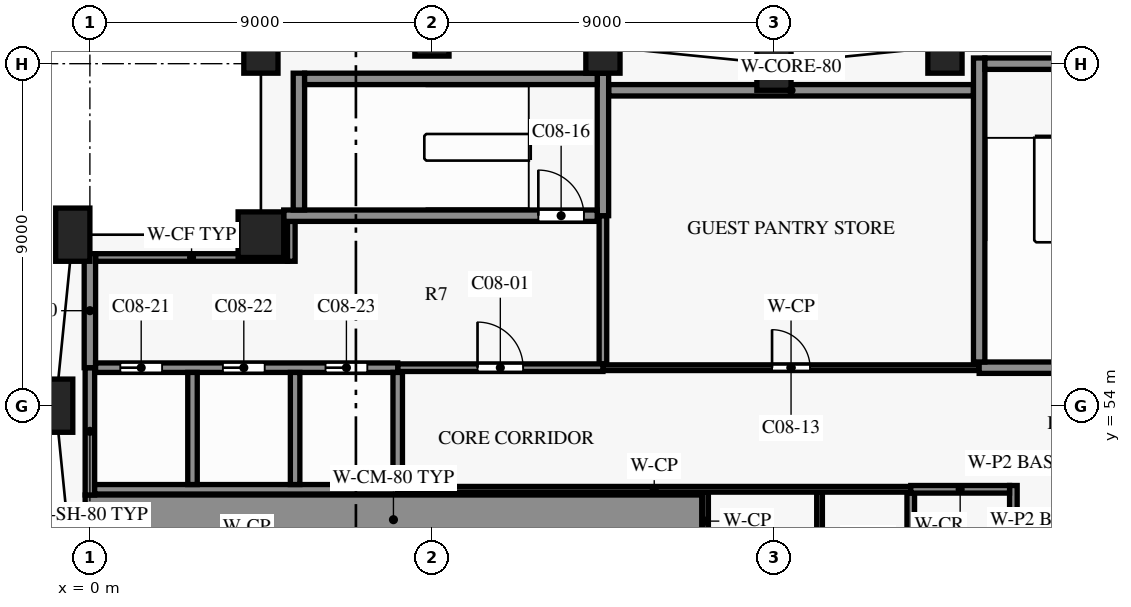
"""IFC4 building model, lengths in metres.
Left out: names, types, materials, properties, quantities, classifications, styles, units other than length and angle.
Written with IfcOpenShell. Run it as: python <this file> out.ifc"""

import sys

from ifc_helpers import new_model, si_unit, direction, frame, frame_2d, origin, origin_2d, place, context, subcontext, project, spatial, rectangle, extrude, element, fill, save


model = new_model("IFC4")
c1 = context("Model", 3, precision=1e-05, world=origin(), true_north=direction((0.0, 1.0)))
c2 = subcontext(c1, "Body", "Model", "MODEL_VIEW")
j1 = project(units=[si_unit("LENGTHUNIT", "METRE"), si_unit("PLANEANGLEUNIT", "RADIAN")], contexts=[c1])
p1 = place(None, origin())
s1 = spatial("IfcSite", under=j1, at=p1, CompositionType="ELEMENT")
p2 = place(p1, origin())
s2 = spatial("IfcBuilding", under=s1, at=p2, CompositionType="ELEMENT")
p3 = place(p2, frame((0.0, 0.0, 44.7)))
s3 = spatial("IfcBuildingStorey", under=s2, at=p3, CompositionType="ELEMENT", Elevation=44.7)
for number, where, z_axis, x_axis in (
    (1, (22.5, 63.45, 0.0), (0.0, 0.0, 1.0), (-0.995, -0.1, 0.0)),
    (2, (18.0, 63.0, 0.0), (0.0, 0.0, 1.0), (-1.0, 0.0, 0.0)),
    (3, (13.5, 63.45, 0.0), (0.0, 0.0, 1.0), (-0.995, 0.1, 0.0)),
    (4, (9.0, 63.9, 0.0), (0.0, 0.0, 1.0), (-1.0, 0.0, 0.0)),
    (5, (4.5, 63.45, 0.0), (0.0, 0.0, 1.0), (-0.995, -0.1, 0.0)),
    (6, (-0.45, 58.5, 0.0), (0.0, 0.0, 1.0), (-0.1, -0.995, 0.0)),
    (7, (-0.9, 54.0, 0.0), (0.0, 0.0, 1.0), (0.0, -1.0, 0.0)),
):
    element("IfcColumn", number, at=place(p3, frame(where, z_axis=z_axis, x_axis=x_axis)), inside=s3, PredefinedType="COLUMN", context=c2, shape_type="SweptSolid", body=[
        extrude(rectangle(XDim=0.9, YDim=1.4, at=origin_2d()), origin(), (0.0, 0.0, 1.0), 3.6),
    ])
p4 = place(p3, frame((4.5, 58.5, 0.0), z_axis=(0.0, 0.0, 1.0), x_axis=(1.0, 0.0, 0.0)))
e8 = element("IfcColumn", 8, at=p4, inside=s3, PredefinedType="COLUMN", context=c2, shape_type="SweptSolid", body=[
    extrude(rectangle(XDim=1.2, YDim=1.2, at=origin_2d()), origin(), (0.0, 0.0, 1.0), 3.6),
])
p5 = place(p3, frame((-0.125, 51.0, 0.0), z_axis=(0.0, 0.0, 1.0), x_axis=(1.0, 0.0, 0.0)))
e9 = element("IfcWall", 9, at=p5, inside=s3, PredefinedType="SHEAR", context=c2, shape_type="SweptSolid", body=[
    extrude(rectangle(XDim=16.225, YDim=1.3, at=frame_2d((8.113, 0.0))), origin(), (0.0, 0.0, 1.0), 3.3),
])
p6 = place(p3, frame((8.1, 51.8, 0.0), z_axis=(0.0, 0.0, 1.0), x_axis=(1.0, 0.0, 0.0)))
e10 = element("IfcWall", 10, at=p6, inside=s3, PredefinedType="PARTITIONING", context=c2, shape_type="SweptSolid", body=[
    extrude(rectangle(XDim=13.5, YDim=0.15, at=frame_2d((6.75, 0.0))), origin(), (0.0, 0.0, 1.0), 3.3),
])
p7 = place(p3, frame((21.6, 51.8, 0.0), z_axis=(0.0, 0.0, 1.0), x_axis=(1.0, 0.0, 0.0)))
e11 = element("IfcWall", 11, at=p7, inside=s3, PredefinedType="PARTITIONING", context=c2, shape_type="SweptSolid", body=[
    extrude(rectangle(XDim=2.6, YDim=0.2, at=frame_2d((1.3, 0.0))), origin(), (0.0, 0.0, 1.0), 3.3),
])
p8 = place(p3, frame((0.125, 51.8, 0.0), z_axis=(0.0, 0.0, 1.0), x_axis=(1.0, 0.0, 0.0)))
e12 = element("IfcWall", 12, at=p8, inside=s3, PredefinedType="SHEAR", context=c2, shape_type="SweptSolid", body=[
    extrude(rectangle(XDim=7.975, YDim=0.25, at=frame_2d((3.988, 0.0))), origin(), (0.0, 0.0, 1.0), 3.3),
])
p9 = place(p3, frame((8.1, 55.0, 0.0), z_axis=(0.0, 0.0, 1.0), x_axis=(1.0, 0.0, 0.0)))
e13 = element("IfcWall", 13, at=p9, inside=s3, PredefinedType="PARTITIONING", context=c2, shape_type="SweptSolid", body=[
    extrude(rectangle(XDim=5.4, YDim=0.2, at=frame_2d((2.7, 0.0))), origin(), (0.0, 0.0, 1.0), 3.3),
])
p10 = place(p9, frame((2.1, 0.0, 0.0)))
e14 = element("IfcOpeningElement", 14, at=p10, cuts=e13, PredefinedType="OPENING", context=c2, shape_type="SweptSolid", body=[
    extrude(rectangle(XDim=1.2, YDim=2.2, at=frame_2d((0.6, 1.1))), frame((0.0, 0.11, 0.0), z_axis=(0.0, -1.0, 0.0), x_axis=(1.0, 0.0, 0.0)), (0.0, 0.0, 1.0), 0.22),
])
p11 = place(p3, frame((13.5, 55.0, 0.0), z_axis=(0.0, 0.0, 1.0), x_axis=(1.0, 0.0, 0.0)))
e15 = element("IfcWall", 15, at=p11, inside=s3, PredefinedType="PARTITIONING", context=c2, shape_type="SweptSolid", body=[
    extrude(rectangle(XDim=9.9, YDim=0.15, at=frame_2d((4.95, 0.0))), origin(), (0.0, 0.0, 1.0), 3.3),
])
p12 = place(p11, frame((4.45, 0.0, 0.0)))
e16 = element("IfcOpeningElement", 16, at=p12, cuts=e15, PredefinedType="OPENING", context=c2, shape_type="SweptSolid", body=[
    extrude(rectangle(XDim=1.0, YDim=2.1, at=frame_2d((0.5, 1.05))), frame((0.0, 0.085, 0.0), z_axis=(0.0, -1.0, 0.0), x_axis=(1.0, 0.0, 0.0)), (0.0, 0.0, 1.0), 0.17),
])
p13 = place(p3, frame((0.15, 55.0, 0.0), z_axis=(0.0, 0.0, 1.0), x_axis=(1.0, 0.0, 0.0)))
e17 = element("IfcWall", 17, at=p13, inside=s3, PredefinedType="SHEAR", context=c2, shape_type="SweptSolid", body=[
    extrude(rectangle(XDim=7.95, YDim=0.25, at=frame_2d((3.975, 0.0))), origin(), (0.0, 0.0, 1.0), 3.3),
])
p14 = place(p13, frame((0.65, 0.0, 0.0)))
e18 = element("IfcOpeningElement", 18, at=p14, cuts=e17, PredefinedType="OPENING", context=c2, shape_type="SweptSolid", body=[
    extrude(rectangle(XDim=1.1, YDim=2.1, at=frame_2d((0.55, 1.05))), frame((0.0, 0.135, 0.0), z_axis=(0.0, -1.0, 0.0), x_axis=(1.0, 0.0, 0.0)), (0.0, 0.0, 1.0), 0.27),
])
p15 = place(p13, frame((3.35, 0.0, 0.0)))
e19 = element("IfcOpeningElement", 19, at=p15, cuts=e17, PredefinedType="OPENING", context=c2, shape_type="SweptSolid", body=[
    extrude(rectangle(XDim=1.1, YDim=2.1, at=frame_2d((0.55, 1.05))), frame((0.0, 0.135, 0.0), z_axis=(0.0, -1.0, 0.0), x_axis=(1.0, 0.0, 0.0)), (0.0, 0.0, 1.0), 0.27),
])
p16 = place(p13, frame((6.05, 0.0, 0.0)))
e20 = element("IfcOpeningElement", 20, at=p16, cuts=e17, PredefinedType="OPENING", context=c2, shape_type="SweptSolid", body=[
    extrude(rectangle(XDim=1.1, YDim=2.1, at=frame_2d((0.55, 1.05))), frame((0.0, 0.135, 0.0), z_axis=(0.0, -1.0, 0.0), x_axis=(1.0, 0.0, 0.0)), (0.0, 0.0, 1.0), 0.27),
])
p17 = place(p3, frame((23.4, 55.0, 0.0), z_axis=(0.0, 0.0, 1.0), x_axis=(1.0, 0.0, 0.0)))
e21 = element("IfcWall", 21, at=p17, inside=s3, PredefinedType="SHEAR", context=c2, shape_type="SweptSolid", body=[
    extrude(rectangle(XDim=3.45, YDim=0.3, at=frame_2d((1.725, 0.0))), origin(), (0.0, 0.0, 1.0), 3.3),
])
p18 = place(p3, frame((0.15, 57.9, 0.0), z_axis=(0.0, 0.0, 1.0), x_axis=(1.0, 0.0, 0.0)))
e22 = element("IfcWall", 22, at=p18, inside=s3, PredefinedType="PARTITIONING", context=c2, shape_type="SweptSolid", body=[
    extrude(rectangle(XDim=5.05, YDim=0.2, at=frame_2d((2.525, 0.0))), origin(), (0.0, 0.0, 1.0), 3.3),
])
p19 = place(p3, frame((5.1, 59.0, 0.0), z_axis=(0.0, 0.0, 1.0), x_axis=(1.0, 0.0, 0.0)))
e23 = element("IfcWall", 23, at=p19, inside=s3, PredefinedType="SHEAR", context=c2, shape_type="SweptSolid", body=[
    extrude(rectangle(XDim=8.25, YDim=0.3, at=frame_2d((4.125, 0.0))), origin(), (0.0, 0.0, 1.0), 3.3),
])
p20 = place(p19, frame((6.7, 0.0, 0.0)))
e24 = element("IfcOpeningElement", 24, at=p20, cuts=e23, PredefinedType="OPENING", context=c2, shape_type="SweptSolid", body=[
    extrude(rectangle(XDim=1.2, YDim=2.2, at=frame_2d((0.6, 1.1))), frame((0.0, 0.16, 0.0), z_axis=(0.0, -1.0, 0.0), x_axis=(1.0, 0.0, 0.0)), (0.0, 0.0, 1.0), 0.32),
])
p21 = place(p3, frame((13.65, 62.3, 0.0), z_axis=(0.0, 0.0, 1.0), x_axis=(1.0, 0.0, 0.0)))
e25 = element("IfcWall", 25, at=p21, inside=s3, PredefinedType="SHEAR", context=c2, shape_type="SweptSolid", body=[
    extrude(rectangle(XDim=9.6, YDim=0.3, at=frame_2d((4.8, 0.0))), origin(), (0.0, 0.0, 1.0), 3.3),
])
p22 = place(p3, frame((5.65, 62.6, 0.0), z_axis=(0.0, 0.0, 1.0), x_axis=(1.0, 0.0, 0.0)))
e26 = element("IfcWall", 26, at=p22, inside=s3, PredefinedType="SHEAR", context=c2, shape_type="SweptSolid", body=[
    extrude(rectangle(XDim=7.7, YDim=0.3, at=frame_2d((3.85, 0.0))), origin(), (0.0, 0.0, 1.0), 3.3),
])
p23 = place(p3, frame((23.55, 63.0, 0.0), z_axis=(0.0, 0.0, 1.0), x_axis=(1.0, 0.0, 0.0)))
e27 = element("IfcWall", 27, at=p23, inside=s3, PredefinedType="SHEAR", context=c2, shape_type="SweptSolid", body=[
    extrude(rectangle(XDim=3.3, YDim=0.3, at=frame_2d((1.65, 0.0))), origin(), (0.0, 0.0, 1.0), 3.3),
])
p24 = place(p3, frame((0.0, 55.0, 0.0), z_axis=(0.0, 0.0, 1.0), x_axis=(0.0, 1.0, 0.0)))
e28 = element("IfcWall", 28, at=p24, inside=s3, PredefinedType="SHEAR", context=c2, shape_type="SweptSolid", body=[
    extrude(rectangle(XDim=3.0, YDim=0.3, at=frame_2d((1.5, 0.0))), origin(), (0.0, 0.0, 1.0), 3.3),
])
p25 = place(p3, frame((0.0, 51.65, 0.0), z_axis=(0.0, 0.0, 1.0), x_axis=(0.0, 1.0, 0.0)))
e29 = element("IfcWall", 29, at=p25, inside=s3, PredefinedType="SHEAR", context=c2, shape_type="SweptSolid", body=[
    extrude(rectangle(XDim=3.35, YDim=0.25, at=frame_2d((1.675, 0.0))), origin(), (0.0, 0.0, 1.0), 3.3),
])
p26 = place(p3, frame((2.7, 51.925, 0.0), z_axis=(0.0, 0.0, 1.0), x_axis=(0.0, 1.0, 0.0)))
e30 = element("IfcWall", 30, at=p26, inside=s3, PredefinedType="SHEAR", context=c2, shape_type="SweptSolid", body=[
    extrude(rectangle(XDim=2.95, YDim=0.25, at=frame_2d((1.475, 0.0))), origin(), (0.0, 0.0, 1.0), 3.3),
])
p27 = place(p3, frame((5.3, 57.8, 0.0), z_axis=(0.0, 0.0, 1.0), x_axis=(0.0, 1.0, 0.0)))
e31 = element("IfcWall", 31, at=p27, inside=s3, PredefinedType="PARTITIONING", context=c2, shape_type="SweptSolid", body=[
    extrude(rectangle(XDim=1.05, YDim=0.2, at=frame_2d((0.525, 0.0))), origin(), (0.0, 0.0, 1.0), 3.3),
])
p28 = place(p3, frame((5.4, 51.925, 0.0), z_axis=(0.0, 0.0, 1.0), x_axis=(0.0, 1.0, 0.0)))
e32 = element("IfcWall", 32, at=p28, inside=s3, PredefinedType="SHEAR", context=c2, shape_type="SweptSolid", body=[
    extrude(rectangle(XDim=2.95, YDim=0.25, at=frame_2d((1.475, 0.0))), origin(), (0.0, 0.0, 1.0), 3.3),
])
p29 = place(p3, frame((5.5, 59.15, 0.0), z_axis=(0.0, 0.0, 1.0), x_axis=(0.0, 1.0, 0.0)))
e33 = element("IfcWall", 33, at=p29, inside=s3, PredefinedType="SHEAR", context=c2, shape_type="SweptSolid", body=[
    extrude(rectangle(XDim=3.6, YDim=0.3, at=frame_2d((1.8, 0.0))), origin(), (0.0, 0.0, 1.0), 3.3),
])
p30 = place(p3, frame((8.1, 51.925, 0.0), z_axis=(0.0, 0.0, 1.0), x_axis=(0.0, 1.0, 0.0)))
e34 = element("IfcWall", 34, at=p30, inside=s3, PredefinedType="SHEAR", context=c2, shape_type="SweptSolid", body=[
    extrude(rectangle(XDim=2.95, YDim=0.25, at=frame_2d((1.475, 0.0))), origin(), (0.0, 0.0, 1.0), 3.3),
])
p31 = place(p3, frame((13.5, 55.1, 0.0), z_axis=(0.0, 0.0, 1.0), x_axis=(0.0, 1.0, 0.0)))
e35 = element("IfcWall", 35, at=p31, inside=s3, PredefinedType="PARTITIONING", context=c2, shape_type="SweptSolid", body=[
    extrude(rectangle(XDim=3.9, YDim=0.2, at=frame_2d((1.95, 0.0))), origin(), (0.0, 0.0, 1.0), 3.3),
])
p32 = place(p3, frame((13.5, 59.0, 0.0), z_axis=(0.0, 0.0, 1.0), x_axis=(0.0, 1.0, 0.0)))
e36 = element("IfcWall", 36, at=p32, inside=s3, PredefinedType="SHEAR", context=c2, shape_type="SweptSolid", body=[
    extrude(rectangle(XDim=3.75, YDim=0.3, at=frame_2d((1.875, 0.0))), origin(), (0.0, 0.0, 1.0), 3.3),
])
p33 = place(p3, frame((16.2, 50.2, 0.0), z_axis=(0.0, 0.0, 1.0), x_axis=(0.0, 1.0, 0.0)))
e37 = element("IfcWall", 37, at=p33, inside=s3, PredefinedType="PARTITIONING", context=c2, shape_type="SweptSolid", body=[
    extrude(rectangle(XDim=1.525, YDim=0.15, at=frame_2d((0.763, 0.0))), origin(), (0.0, 0.0, 1.0), 3.3),
])
p34 = place(p3, frame((19.2, 47.1, 0.0), z_axis=(0.0, 0.0, 1.0), x_axis=(0.0, 1.0, 0.0)))
e38 = element("IfcWall", 38, at=p34, inside=s3, PredefinedType="PARTITIONING", context=c2, shape_type="SweptSolid", body=[
    extrude(rectangle(XDim=4.625, YDim=0.15, at=frame_2d((2.312, 0.0))), origin(), (0.0, 0.0, 1.0), 3.3),
])
p35 = place(p3, frame((21.6, 47.1, 0.0), z_axis=(0.0, 0.0, 1.0), x_axis=(0.0, 1.0, 0.0)))
e39 = element("IfcWall", 39, at=p35, inside=s3, PredefinedType="PARTITIONING", context=c2, shape_type="SweptSolid", body=[
    extrude(rectangle(XDim=4.6, YDim=0.2, at=frame_2d((2.3, 0.0))), origin(), (0.0, 0.0, 1.0), 3.3),
])
p36 = place(p3, frame((23.4, 55.15, 0.0), z_axis=(0.0, 0.0, 1.0), x_axis=(0.0, 1.0, 0.0)))
e40 = element("IfcWall", 40, at=p36, inside=s3, PredefinedType="SHEAR", context=c2, shape_type="SweptSolid", body=[
    extrude(rectangle(XDim=8.0, YDim=0.3, at=frame_2d((4.0, 0.0))), origin(), (0.0, 0.0, 1.0), 3.3),
])
p37 = place(p3, frame((24.3, 46.9, 0.0), z_axis=(0.0, 0.0, 1.0), x_axis=(0.0, 1.0, 0.0)))
e41 = element("IfcWall", 41, at=p37, inside=s3, PredefinedType="SHEAR", context=c2, shape_type="SweptSolid", body=[
    extrude(rectangle(XDim=5.0, YDim=0.2, at=frame_2d((2.5, 0.0))), origin(), (0.0, 0.0, 1.0), 3.3),
])
p38 = place(p10, origin())
e42 = element("IfcDoor", 42, at=p38, inside=s3, OperationType="SINGLE_SWING_RIGHT", PredefinedType="DOOR", context=c2, shape_type="SweptSolid", body=[
    extrude(rectangle(XDim=1.2, YDim=2.2, at=frame_2d((0.6, 1.1))), frame((0.0, 0.025, 0.0), z_axis=(0.0, -1.0, 0.0), x_axis=(1.0, 0.0, 0.0)), (0.0, 0.0, 1.0), 0.05),
])
fill(e14, e42)
p39 = place(p12, origin())
e43 = element("IfcDoor", 43, at=p39, inside=s3, OperationType="SINGLE_SWING_LEFT", PredefinedType="DOOR", context=c2, shape_type="SweptSolid", body=[
    extrude(rectangle(XDim=1.0, YDim=2.1, at=frame_2d((0.5, 1.05))), frame((0.0, 0.025, 0.0), z_axis=(0.0, -1.0, 0.0), x_axis=(1.0, 0.0, 0.0)), (0.0, 0.0, 1.0), 0.05),
])
fill(e16, e43)
p40 = place(p20, origin())
e44 = element("IfcDoor", 44, at=p40, inside=s3, OperationType="SINGLE_SWING_RIGHT", PredefinedType="DOOR", context=c2, shape_type="SweptSolid", body=[
    extrude(rectangle(XDim=1.2, YDim=2.2, at=frame_2d((0.6, 1.1))), frame((0.0, 0.025, 0.0), z_axis=(0.0, -1.0, 0.0), x_axis=(1.0, 0.0, 0.0)), (0.0, 0.0, 1.0), 0.05),
])
fill(e24, e44)
p41 = place(p14, origin())
e45 = element("IfcDoor", 45, at=p41, inside=s3, OperationType="DOUBLE_DOOR_SLIDING", PredefinedType="DOOR", context=c2, shape_type="SweptSolid", body=[
    extrude(rectangle(XDim=1.1, YDim=2.1, at=frame_2d((0.55, 1.05))), frame((0.0, 0.025, 0.0), z_axis=(0.0, -1.0, 0.0), x_axis=(1.0, 0.0, 0.0)), (0.0, 0.0, 1.0), 0.05),
])
fill(e18, e45)
p42 = place(p15, origin())
e46 = element("IfcDoor", 46, at=p42, inside=s3, OperationType="DOUBLE_DOOR_SLIDING", PredefinedType="DOOR", context=c2, shape_type="SweptSolid", body=[
    extrude(rectangle(XDim=1.1, YDim=2.1, at=frame_2d((0.55, 1.05))), frame((0.0, 0.025, 0.0), z_axis=(0.0, -1.0, 0.0), x_axis=(1.0, 0.0, 0.0)), (0.0, 0.0, 1.0), 0.05),
])
fill(e19, e46)
p43 = place(p16, origin())
e47 = element("IfcDoor", 47, at=p43, inside=s3, OperationType="DOUBLE_DOOR_SLIDING", PredefinedType="DOOR", context=c2, shape_type="SweptSolid", body=[
    extrude(rectangle(XDim=1.1, YDim=2.1, at=frame_2d((0.55, 1.05))), frame((0.0, 0.025, 0.0), z_axis=(0.0, -1.0, 0.0), x_axis=(1.0, 0.0, 0.0)), (0.0, 0.0, 1.0), 0.05),
])
fill(e20, e47)
save(model, sys.argv[1])
